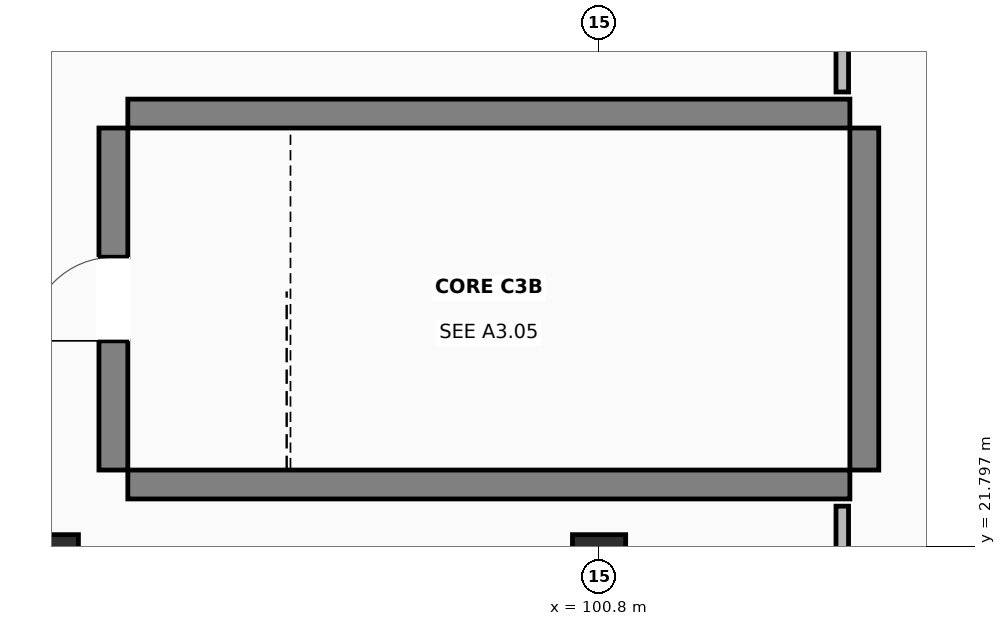
"""IFC4 building model, lengths in metres.
Left out: names, types, materials, properties, quantities, classifications, styles, units other than length and angle.
Written with IfcOpenShell. Run it as: python <this file> out.ifc"""

import sys

from ifc_helpers import new_model, si_unit, direction, frame, frame_2d, origin, origin_2d, place, context, subcontext, project, spatial, rectangle, extrude, element, fill, save


model = new_model("IFC4")
c1 = context("Model", 3, precision=1e-05, world=origin(), true_north=direction((0.0, 1.0)))
c2 = subcontext(c1, "Body", "Model", "MODEL_VIEW")
j1 = project(units=[si_unit("LENGTHUNIT", "METRE"), si_unit("PLANEANGLEUNIT", "RADIAN")], contexts=[c1])
p1 = place(None, origin())
s1 = spatial("IfcSite", under=j1, at=p1, CompositionType="ELEMENT")
p2 = place(p1, origin())
s2 = spatial("IfcBuilding", under=s1, at=p2, CompositionType="ELEMENT")
p3 = place(p2, frame((0.0, 0.0, 22.5)))
s3 = spatial("IfcBuildingStorey", under=s2, at=p3, CompositionType="ELEMENT", Elevation=22.5)
for number, where, z_axis, x_axis in (
    (1, (93.6, 21.6, 0.0), (0.0, 0.0, 1.0), (1.0, 0.0, 0.0)),
    (2, (100.8, 21.6, 0.0), (0.0, 0.0, 1.0), (1.0, 0.0, 0.0)),
):
    element("IfcColumn", number, at=place(p3, frame(where, z_axis=z_axis, x_axis=x_axis)), inside=s3, PredefinedType="COLUMN", context=c2, shape_type="SweptSolid", body=[
        extrude(rectangle(XDim=0.7, YDim=0.7, at=origin_2d()), origin(), (0.0, 0.0, 1.0), 4.5),
    ])
for number, where, z_axis, x_axis in (
    (3, (94.6, 22.61, 0.0), (0.0, 0.0, 1.0), (1.0, 0.0, 0.0)),
    (4, (94.6, 27.49, 0.0), (0.0, 0.0, 1.0), (1.0, 0.0, 0.0)),
):
    element("IfcWall", number, at=place(p3, frame(where, z_axis=z_axis, x_axis=x_axis)), inside=s3, PredefinedType="SHEAR", context=c2, shape_type="SweptSolid", body=[
        extrude(rectangle(XDim=9.5, YDim=0.38, at=frame_2d((4.75, 0.0))), origin(), (0.0, 0.0, 1.0), 4.22),
    ])
p4 = place(p3, frame((94.41, 22.8, 0.0), z_axis=(0.0, 0.0, 1.0), x_axis=(0.0, 1.0, 0.0)))
e5 = element("IfcWall", 5, at=p4, inside=s3, PredefinedType="SHEAR", context=c2, shape_type="SweptSolid", body=[
    extrude(rectangle(XDim=4.5, YDim=0.38, at=frame_2d((2.25, 0.0))), origin(), (0.0, 0.0, 1.0), 4.22),
])
p5 = place(p4, frame((1.7, 0.0, 0.0)))
e6 = element("IfcOpeningElement", 6, at=p5, cuts=e5, PredefinedType="OPENING", context=c2, shape_type="SweptSolid", body=[
    extrude(rectangle(XDim=1.1, YDim=2.15, at=frame_2d((0.55, 1.075))), frame((0.0, 0.2, 0.0), z_axis=(0.0, -1.0, 0.0), x_axis=(1.0, 0.0, 0.0)), (0.0, 0.0, 1.0), 0.4),
])
p6 = place(p3, frame((104.29, 22.8, 0.0), z_axis=(0.0, 0.0, 1.0), x_axis=(0.0, 1.0, 0.0)))
e7 = element("IfcWall", 7, at=p6, inside=s3, PredefinedType="SHEAR", context=c2, shape_type="SweptSolid", body=[
    extrude(rectangle(XDim=4.5, YDim=0.38, at=frame_2d((2.25, 0.0))), origin(), (0.0, 0.0, 1.0), 4.22),
])
p7 = place(p3, frame((104.0, 20.002, 0.0), z_axis=(0.0, 0.0, 1.0), x_axis=(0.0, 1.0, 0.0)))
e8 = element("IfcWall", 8, at=p7, inside=s3, PredefinedType="PARTITIONING", context=c2, shape_type="SweptSolid", body=[
    extrude(rectangle(XDim=2.323, YDim=0.165, at=frame_2d((1.162, 0.0))), origin(), (0.0, 0.0, 1.0), 3.26),
])
p8 = place(p3, frame((104.0, 27.774, 0.0), z_axis=(0.0, 0.0, 1.0), x_axis=(0.0, 1.0, 0.0)))
e9 = element("IfcWall", 9, at=p8, inside=s3, PredefinedType="PARTITIONING", context=c2, shape_type="SweptSolid", body=[
    extrude(rectangle(XDim=2.406, YDim=0.165, at=frame_2d((1.203, 0.0))), origin(), (0.0, 0.0, 1.0), 3.26),
])
p9 = place(p5, origin())
e10 = element("IfcDoor", 10, at=p9, inside=s3, OperationType="SINGLE_SWING_LEFT", PredefinedType="DOOR", context=c2, shape_type="SweptSolid", body=[
    extrude(rectangle(XDim=1.1, YDim=2.15, at=frame_2d((0.55, 1.075))), frame((0.0, 0.025, 0.0), z_axis=(0.0, -1.0, 0.0), x_axis=(1.0, 0.0, 0.0)), (0.0, 0.0, 1.0), 0.05),
])
fill(e6, e10)
save(model, sys.argv[1])
